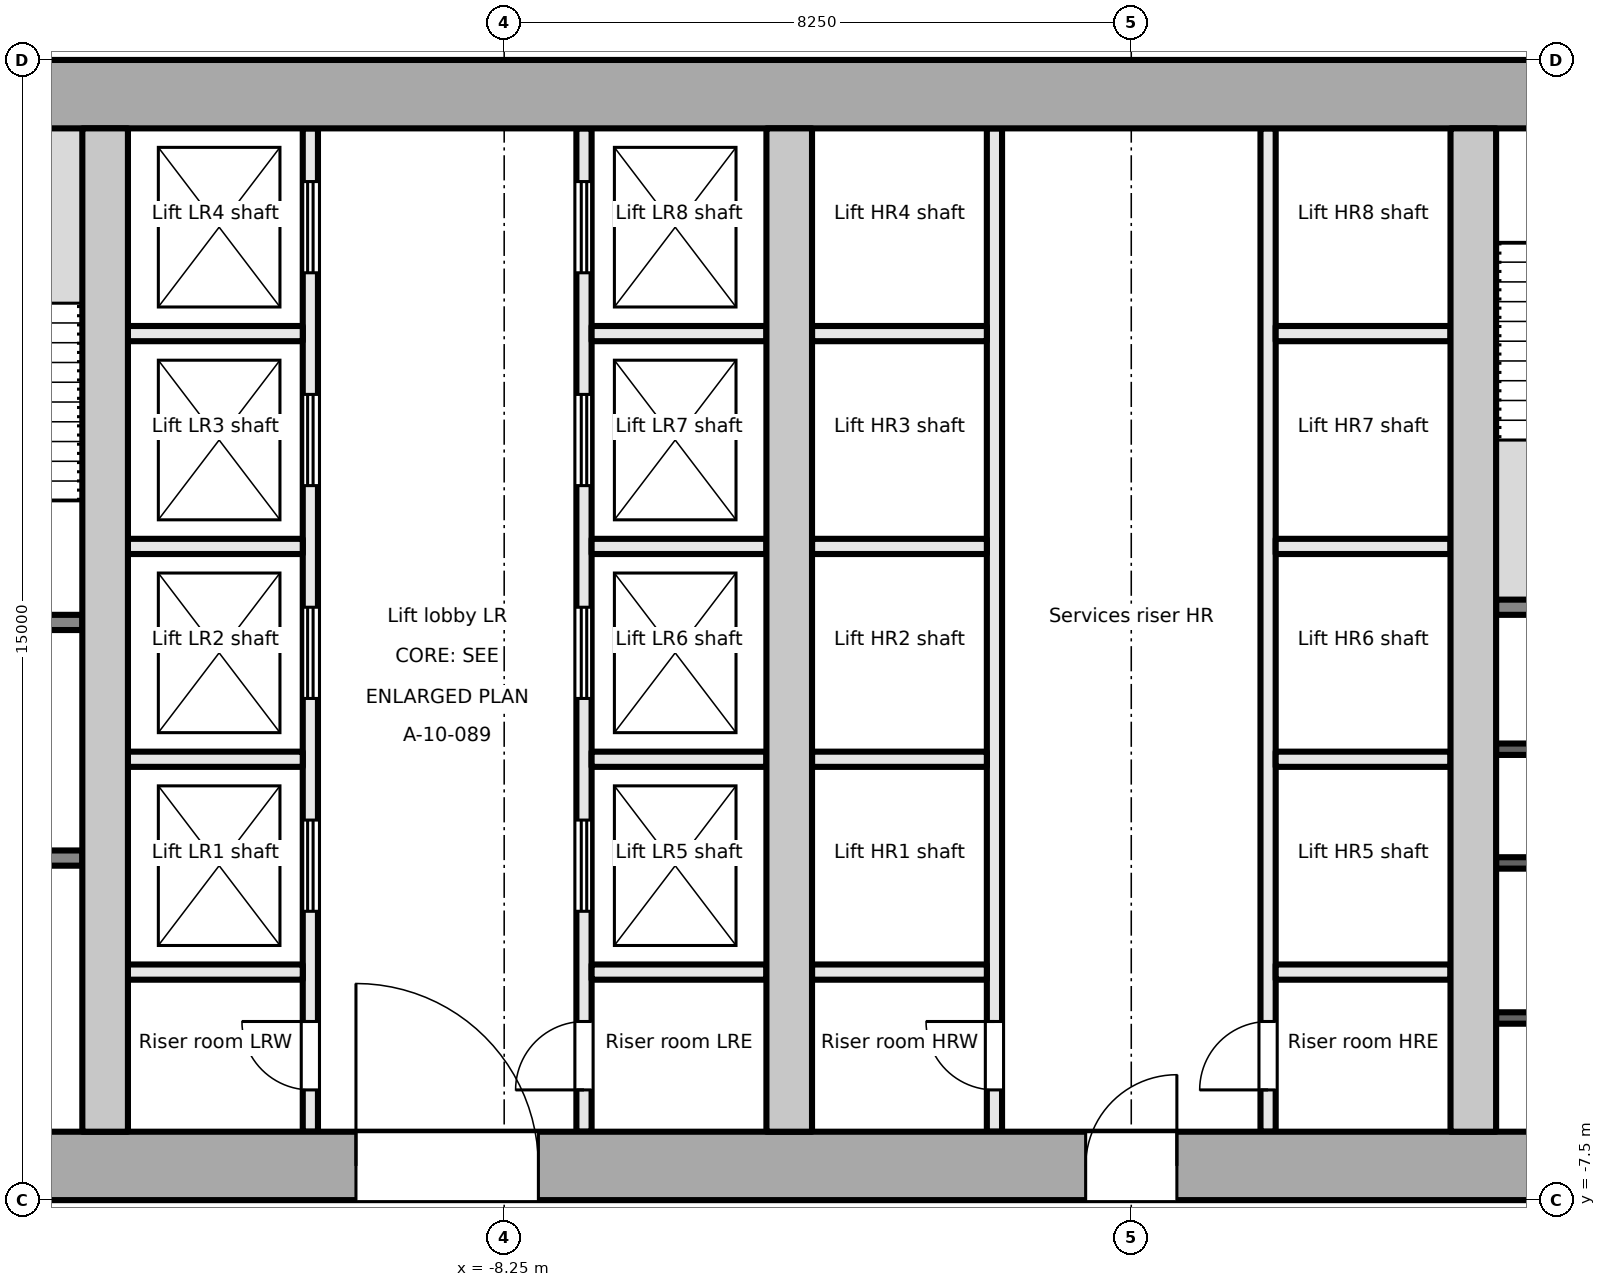
"""IFC4 building model, lengths in metres.
Left out: names, types, materials, properties, quantities, classifications, styles, units other than length and angle.
Written with IfcOpenShell. Run it as: python <this file> out.ifc"""

import sys

from ifc_helpers import new_model, si_unit, direction, frame, frame_2d, origin, place, context, subcontext, project, spatial, rectangle, extrude, element, fill, save


model = new_model("IFC4")
c1 = context("Model", 3, precision=1e-05, world=origin(), true_north=direction((0.0, 1.0)))
c2 = subcontext(c1, "Body", "Model", "MODEL_VIEW")
j1 = project(units=[si_unit("LENGTHUNIT", "METRE"), si_unit("PLANEANGLEUNIT", "RADIAN")], contexts=[c1])
p1 = place(None, origin())
s1 = spatial("IfcSite", under=j1, at=p1, CompositionType="ELEMENT")
p2 = place(p1, origin())
s2 = spatial("IfcBuilding", under=s1, at=p2, CompositionType="ELEMENT")
p3 = place(p2, frame((0.0, 0.0, 61.1)))
s3 = spatial("IfcBuildingStorey", under=s2, at=p3, CompositionType="ELEMENT", Elevation=61.1)
p4 = place(p3, frame((-18.0, -7.05, -0.2), z_axis=(0.0, 0.0, 1.0), x_axis=(1.0, 0.0, 0.0)))
e1 = element("IfcWall", 1, at=p4, inside=s3, PredefinedType="SHEAR", context=c2, shape_type="SweptSolid", body=[
    extrude(rectangle(XDim=36.0, YDim=0.9, at=frame_2d((18.0, 0.0))), origin(), (0.0, 0.0, 1.0), 4.1),
])
p5 = place(p4, frame((7.8, 0.0, 0.2)))
e2 = element("IfcOpeningElement", 2, at=p5, cuts=e1, PredefinedType="OPENING", context=c2, shape_type="SweptSolid", body=[
    extrude(rectangle(XDim=2.4, YDim=2.1, at=frame_2d((1.2, 1.05))), frame((0.0, 0.46, 0.0), z_axis=(0.0, -1.0, 0.0), x_axis=(1.0, 0.0, 0.0)), (0.0, 0.0, 1.0), 0.921),
])
p6 = place(p4, frame((17.4, 0.0, 0.2)))
e3 = element("IfcOpeningElement", 3, at=p6, cuts=e1, PredefinedType="OPENING", context=c2, shape_type="SweptSolid", body=[
    extrude(rectangle(XDim=1.2, YDim=2.1, at=frame_2d((0.6, 1.05))), frame((0.0, 0.46, 0.0), z_axis=(0.0, -1.0, 0.0), x_axis=(1.0, 0.0, 0.0)), (0.0, 0.0, 1.0), 0.921),
])
p7 = place(p4, frame((26.1, 0.0, 0.2)))
e4 = element("IfcOpeningElement", 4, at=p7, cuts=e1, PredefinedType="OPENING", context=c2, shape_type="SweptSolid", body=[
    extrude(rectangle(XDim=2.4, YDim=2.1, at=frame_2d((1.2, 1.05))), frame((0.0, 0.46, 0.0), z_axis=(0.0, -1.0, 0.0), x_axis=(1.0, 0.0, 0.0)), (0.0, 0.0, 1.0), 0.921),
])
p8 = place(p3, frame((-18.0, 7.05, -0.2), z_axis=(0.0, 0.0, 1.0), x_axis=(1.0, 0.0, 0.0)))
e5 = element("IfcWall", 5, at=p8, inside=s3, PredefinedType="SHEAR", context=c2, shape_type="SweptSolid", body=[
    extrude(rectangle(XDim=36.0, YDim=0.9, at=frame_2d((18.0, 0.0))), origin(), (0.0, 0.0, 1.0), 4.1),
])
for number, where, z_axis, x_axis in (
    (6, (-13.5, -6.6, -0.2), (0.0, 0.0, 1.0), (0.0, 1.0, 0.0)),
    (7, (-4.5, -6.6, -0.2), (0.0, 0.0, 1.0), (0.0, 1.0, 0.0)),
    (8, (4.5, -6.6, -0.2), (0.0, 0.0, 1.0), (0.0, 1.0, 0.0)),
):
    element("IfcWall", number, at=place(p3, frame(where, z_axis=z_axis, x_axis=x_axis)), inside=s3, PredefinedType="SHEAR", context=c2, shape_type="SweptSolid", body=[
        extrude(rectangle(XDim=13.2, YDim=0.6, at=frame_2d((6.6, 0.0))), origin(), (0.0, 0.0, 1.0), 4.1),
    ])
p9 = place(p3, frame((-17.1, -3.0, 0.0), z_axis=(0.0, 0.0, 1.0), x_axis=(1.0, 0.0, 0.0)))
e9 = element("IfcWall", 9, at=p9, inside=s3, PredefinedType="PARTITIONING", context=c2, shape_type="SweptSolid", body=[
    extrude(rectangle(XDim=3.3, YDim=0.2, at=frame_2d((1.65, 0.0))), origin(), (0.0, 0.0, 1.0), 3.9),
])
p10 = place(p9, frame((1.1, 0.0, 0.0)))
e10 = element("IfcOpeningElement", 10, at=p10, cuts=e9, PredefinedType="OPENING", context=c2, shape_type="SweptSolid", body=[
    extrude(rectangle(XDim=1.1, YDim=2.1, at=frame_2d((0.55, 1.05))), frame((0.0, 0.111, 0.0), z_axis=(0.0, -1.0, 0.0), x_axis=(1.0, 0.0, 0.0)), (0.0, 0.0, 1.0), 0.221),
])
p11 = place(p3, frame((-17.1, 0.1, 0.0), z_axis=(0.0, 0.0, 1.0), x_axis=(1.0, 0.0, 0.0)))
e11 = element("IfcWall", 11, at=p11, inside=s3, PredefinedType="PARTITIONING", context=c2, shape_type="SweptSolid", body=[
    extrude(rectangle(XDim=3.3, YDim=0.2, at=frame_2d((1.65, 0.0))), origin(), (0.0, 0.0, 1.0), 3.9),
])
p12 = place(p11, frame((1.1, 0.0, 0.0)))
e12 = element("IfcOpeningElement", 12, at=p12, cuts=e11, PredefinedType="OPENING", context=c2, shape_type="SweptSolid", body=[
    extrude(rectangle(XDim=1.1, YDim=2.1, at=frame_2d((0.55, 1.05))), frame((0.0, 0.111, 0.0), z_axis=(0.0, -1.0, 0.0), x_axis=(1.0, 0.0, 0.0)), (0.0, 0.0, 1.0), 0.221),
])
p13 = place(p3, frame((-10.8, -6.6, 0.0), z_axis=(0.0, 0.0, 1.0), x_axis=(0.0, 1.0, 0.0)))
e13 = element("IfcWall", 13, at=p13, inside=s3, PredefinedType="PARTITIONING", context=c2, shape_type="SweptSolid", body=[
    extrude(rectangle(XDim=13.2, YDim=0.2, at=frame_2d((6.6, 0.0))), origin(), (0.0, 0.0, 1.0), 3.9),
])
p14 = place(p13, frame((0.55, 0.0, 0.0)))
e14 = element("IfcOpeningElement", 14, at=p14, cuts=e13, PredefinedType="OPENING", context=c2, shape_type="SweptSolid", body=[
    extrude(rectangle(XDim=0.9, YDim=2.1, at=frame_2d((0.45, 1.05))), frame((0.0, 0.111, 0.0), z_axis=(0.0, -1.0, 0.0), x_axis=(1.0, 0.0, 0.0)), (0.0, 0.0, 1.0), 0.221),
])
p15 = place(p13, frame((2.9, 0.0, 0.0)))
e15 = element("IfcOpeningElement", 15, at=p15, cuts=e13, PredefinedType="OPENING", context=c2, shape_type="SweptSolid", body=[
    extrude(rectangle(XDim=1.2, YDim=2.1, at=frame_2d((0.6, 1.05))), frame((0.0, 0.111, 0.0), z_axis=(0.0, -1.0, 0.0), x_axis=(1.0, 0.0, 0.0)), (0.0, 0.0, 1.0), 0.221),
])
p16 = place(p13, frame((5.7, 0.0, 0.0)))
e16 = element("IfcOpeningElement", 16, at=p16, cuts=e13, PredefinedType="OPENING", context=c2, shape_type="SweptSolid", body=[
    extrude(rectangle(XDim=1.2, YDim=2.1, at=frame_2d((0.6, 1.05))), frame((0.0, 0.111, 0.0), z_axis=(0.0, -1.0, 0.0), x_axis=(1.0, 0.0, 0.0)), (0.0, 0.0, 1.0), 0.221),
])
p17 = place(p13, frame((8.5, 0.0, 0.0)))
e17 = element("IfcOpeningElement", 17, at=p17, cuts=e13, PredefinedType="OPENING", context=c2, shape_type="SweptSolid", body=[
    extrude(rectangle(XDim=1.2, YDim=2.1, at=frame_2d((0.6, 1.05))), frame((0.0, 0.111, 0.0), z_axis=(0.0, -1.0, 0.0), x_axis=(1.0, 0.0, 0.0)), (0.0, 0.0, 1.0), 0.221),
])
p18 = place(p13, frame((11.3, 0.0, 0.0)))
e18 = element("IfcOpeningElement", 18, at=p18, cuts=e13, PredefinedType="OPENING", context=c2, shape_type="SweptSolid", body=[
    extrude(rectangle(XDim=1.2, YDim=2.1, at=frame_2d((0.6, 1.05))), frame((0.0, 0.111, 0.0), z_axis=(0.0, -1.0, 0.0), x_axis=(1.0, 0.0, 0.0)), (0.0, 0.0, 1.0), 0.221),
])
p19 = place(p3, frame((-7.2, -6.6, 0.0), z_axis=(0.0, 0.0, 1.0), x_axis=(0.0, 1.0, 0.0)))
e19 = element("IfcWall", 19, at=p19, inside=s3, PredefinedType="PARTITIONING", context=c2, shape_type="SweptSolid", body=[
    extrude(rectangle(XDim=13.2, YDim=0.2, at=frame_2d((6.6, 0.0))), origin(), (0.0, 0.0, 1.0), 3.9),
])
p20 = place(p19, frame((0.55, 0.0, 0.0)))
e20 = element("IfcOpeningElement", 20, at=p20, cuts=e19, PredefinedType="OPENING", context=c2, shape_type="SweptSolid", body=[
    extrude(rectangle(XDim=0.9, YDim=2.1, at=frame_2d((0.45, 1.05))), frame((0.0, 0.111, 0.0), z_axis=(0.0, -1.0, 0.0), x_axis=(1.0, 0.0, 0.0)), (0.0, 0.0, 1.0), 0.221),
])
p21 = place(p19, frame((2.9, 0.0, 0.0)))
e21 = element("IfcOpeningElement", 21, at=p21, cuts=e19, PredefinedType="OPENING", context=c2, shape_type="SweptSolid", body=[
    extrude(rectangle(XDim=1.2, YDim=2.1, at=frame_2d((0.6, 1.05))), frame((0.0, 0.111, 0.0), z_axis=(0.0, -1.0, 0.0), x_axis=(1.0, 0.0, 0.0)), (0.0, 0.0, 1.0), 0.221),
])
p22 = place(p19, frame((5.7, 0.0, 0.0)))
e22 = element("IfcOpeningElement", 22, at=p22, cuts=e19, PredefinedType="OPENING", context=c2, shape_type="SweptSolid", body=[
    extrude(rectangle(XDim=1.2, YDim=2.1, at=frame_2d((0.6, 1.05))), frame((0.0, 0.111, 0.0), z_axis=(0.0, -1.0, 0.0), x_axis=(1.0, 0.0, 0.0)), (0.0, 0.0, 1.0), 0.221),
])
p23 = place(p19, frame((8.5, 0.0, 0.0)))
e23 = element("IfcOpeningElement", 23, at=p23, cuts=e19, PredefinedType="OPENING", context=c2, shape_type="SweptSolid", body=[
    extrude(rectangle(XDim=1.2, YDim=2.1, at=frame_2d((0.6, 1.05))), frame((0.0, 0.111, 0.0), z_axis=(0.0, -1.0, 0.0), x_axis=(1.0, 0.0, 0.0)), (0.0, 0.0, 1.0), 0.221),
])
p24 = place(p19, frame((11.3, 0.0, 0.0)))
e24 = element("IfcOpeningElement", 24, at=p24, cuts=e19, PredefinedType="OPENING", context=c2, shape_type="SweptSolid", body=[
    extrude(rectangle(XDim=1.2, YDim=2.1, at=frame_2d((0.6, 1.05))), frame((0.0, 0.111, 0.0), z_axis=(0.0, -1.0, 0.0), x_axis=(1.0, 0.0, 0.0)), (0.0, 0.0, 1.0), 0.221),
])
for number, where, z_axis, x_axis in (
    (25, (-13.2, -1.7, 0.0), (0.0, 0.0, 1.0), (1.0, 0.0, 0.0)),
    (26, (-13.2, 1.1, 0.0), (0.0, 0.0, 1.0), (1.0, 0.0, 0.0)),
    (27, (-13.2, 3.9, 0.0), (0.0, 0.0, 1.0), (1.0, 0.0, 0.0)),
    (28, (-13.2, -4.5, 0.0), (0.0, 0.0, 1.0), (1.0, 0.0, 0.0)),
    (29, (-7.1, -1.7, 0.0), (0.0, 0.0, 1.0), (1.0, 0.0, 0.0)),
    (30, (-7.1, 1.1, 0.0), (0.0, 0.0, 1.0), (1.0, 0.0, 0.0)),
    (31, (-7.1, 3.9, 0.0), (0.0, 0.0, 1.0), (1.0, 0.0, 0.0)),
    (32, (-7.1, -4.5, 0.0), (0.0, 0.0, 1.0), (1.0, 0.0, 0.0)),
):
    element("IfcWall", number, at=place(p3, frame(where, z_axis=z_axis, x_axis=x_axis)), inside=s3, PredefinedType="PARTITIONING", context=c2, shape_type="SweptSolid", body=[
        extrude(rectangle(XDim=2.3, YDim=0.2, at=frame_2d((1.15, 0.0))), origin(), (0.0, 0.0, 1.0), 3.9),
    ])
p25 = place(p3, frame((-1.8, -6.6, 0.0), z_axis=(0.0, 0.0, 1.0), x_axis=(0.0, 1.0, 0.0)))
e33 = element("IfcWall", 33, at=p25, inside=s3, PredefinedType="PARTITIONING", context=c2, shape_type="SweptSolid", body=[
    extrude(rectangle(XDim=13.2, YDim=0.2, at=frame_2d((6.6, 0.0))), origin(), (0.0, 0.0, 1.0), 3.9),
])
p26 = place(p25, frame((0.55, 0.0, 0.0)))
e34 = element("IfcOpeningElement", 34, at=p26, cuts=e33, PredefinedType="OPENING", context=c2, shape_type="SweptSolid", body=[
    extrude(rectangle(XDim=0.9, YDim=2.1, at=frame_2d((0.45, 1.05))), frame((0.0, 0.111, 0.0), z_axis=(0.0, -1.0, 0.0), x_axis=(1.0, 0.0, 0.0)), (0.0, 0.0, 1.0), 0.221),
])
p27 = place(p3, frame((1.8, -6.6, 0.0), z_axis=(0.0, 0.0, 1.0), x_axis=(0.0, 1.0, 0.0)))
e35 = element("IfcWall", 35, at=p27, inside=s3, PredefinedType="PARTITIONING", context=c2, shape_type="SweptSolid", body=[
    extrude(rectangle(XDim=13.2, YDim=0.2, at=frame_2d((6.6, 0.0))), origin(), (0.0, 0.0, 1.0), 3.9),
])
p28 = place(p27, frame((0.55, 0.0, 0.0)))
e36 = element("IfcOpeningElement", 36, at=p28, cuts=e35, PredefinedType="OPENING", context=c2, shape_type="SweptSolid", body=[
    extrude(rectangle(XDim=0.9, YDim=2.1, at=frame_2d((0.45, 1.05))), frame((0.0, 0.111, 0.0), z_axis=(0.0, -1.0, 0.0), x_axis=(1.0, 0.0, 0.0)), (0.0, 0.0, 1.0), 0.221),
])
for number, where, z_axis, x_axis in (
    (37, (-4.2, -1.7, 0.0), (0.0, 0.0, 1.0), (1.0, 0.0, 0.0)),
    (38, (-4.2, 1.1, 0.0), (0.0, 0.0, 1.0), (1.0, 0.0, 0.0)),
    (39, (-4.2, 3.9, 0.0), (0.0, 0.0, 1.0), (1.0, 0.0, 0.0)),
    (40, (-4.2, -4.5, 0.0), (0.0, 0.0, 1.0), (1.0, 0.0, 0.0)),
    (41, (1.9, -1.7, 0.0), (0.0, 0.0, 1.0), (1.0, 0.0, 0.0)),
    (42, (1.9, 1.1, 0.0), (0.0, 0.0, 1.0), (1.0, 0.0, 0.0)),
    (43, (1.9, 3.9, 0.0), (0.0, 0.0, 1.0), (1.0, 0.0, 0.0)),
    (44, (1.9, -4.5, 0.0), (0.0, 0.0, 1.0), (1.0, 0.0, 0.0)),
):
    element("IfcWall", number, at=place(p3, frame(where, z_axis=z_axis, x_axis=x_axis)), inside=s3, PredefinedType="PARTITIONING", context=c2, shape_type="SweptSolid", body=[
        extrude(rectangle(XDim=2.3, YDim=0.2, at=frame_2d((1.15, 0.0))), origin(), (0.0, 0.0, 1.0), 3.9),
    ])
p29 = place(p3, frame((4.8, 0.3, 0.0), z_axis=(0.0, 0.0, 1.0), x_axis=(1.0, 0.0, 0.0)))
e45 = element("IfcWall", 45, at=p29, inside=s3, PredefinedType="PARTITIONING", context=c2, shape_type="SweptSolid", body=[
    extrude(rectangle(XDim=3.15, YDim=0.2, at=frame_2d((1.575, 0.0))), origin(), (0.0, 0.0, 1.0), 3.9),
])
for number, where, z_axis, x_axis in (
    (46, (4.8, -5.104, 0.0), (0.0, 0.0, 1.0), (1.0, 0.0, 0.0)),
    (47, (4.8, -3.064, 0.0), (0.0, 0.0, 1.0), (1.0, 0.0, 0.0)),
    (48, (4.8, -1.568, 0.0), (0.0, 0.0, 1.0), (1.0, 0.0, 0.0)),
):
    element("IfcWall", number, at=place(p3, frame(where, z_axis=z_axis, x_axis=x_axis)), inside=s3, PredefinedType="PARTITIONING", context=c2, shape_type="SweptSolid", body=[
        extrude(rectangle(XDim=3.15, YDim=0.15, at=frame_2d((1.575, 0.0))), origin(), (0.0, 0.0, 1.0), 3.9),
    ])
p30 = place(p14, origin())
e49 = element("IfcDoor", 49, at=p30, inside=s3, OperationType="SINGLE_SWING_RIGHT", PredefinedType="DOOR", context=c2, shape_type="SweptSolid", body=[
    extrude(rectangle(XDim=0.9, YDim=2.1, at=frame_2d((0.45, 1.05))), frame((0.0, 0.025, 0.0), z_axis=(0.0, -1.0, 0.0), x_axis=(1.0, 0.0, 0.0)), (0.0, 0.0, 1.0), 0.05),
])
fill(e14, e49)
p31 = place(p15, origin())
e50 = element("IfcDoor", 50, at=p31, inside=s3, OperationType="DOUBLE_DOOR_SLIDING", PredefinedType="DOOR", context=c2, shape_type="SweptSolid", body=[
    extrude(rectangle(XDim=1.2, YDim=2.1, at=frame_2d((0.6, 1.05))), frame((0.0, 0.025, 0.0), z_axis=(0.0, -1.0, 0.0), x_axis=(1.0, 0.0, 0.0)), (0.0, 0.0, 1.0), 0.05),
])
fill(e15, e50)
p32 = place(p16, origin())
e51 = element("IfcDoor", 51, at=p32, inside=s3, OperationType="DOUBLE_DOOR_SLIDING", PredefinedType="DOOR", context=c2, shape_type="SweptSolid", body=[
    extrude(rectangle(XDim=1.2, YDim=2.1, at=frame_2d((0.6, 1.05))), frame((0.0, 0.025, 0.0), z_axis=(0.0, -1.0, 0.0), x_axis=(1.0, 0.0, 0.0)), (0.0, 0.0, 1.0), 0.05),
])
fill(e16, e51)
p33 = place(p17, origin())
e52 = element("IfcDoor", 52, at=p33, inside=s3, OperationType="DOUBLE_DOOR_SLIDING", PredefinedType="DOOR", context=c2, shape_type="SweptSolid", body=[
    extrude(rectangle(XDim=1.2, YDim=2.1, at=frame_2d((0.6, 1.05))), frame((0.0, 0.025, 0.0), z_axis=(0.0, -1.0, 0.0), x_axis=(1.0, 0.0, 0.0)), (0.0, 0.0, 1.0), 0.05),
])
fill(e17, e52)
p34 = place(p18, origin())
e53 = element("IfcDoor", 53, at=p34, inside=s3, OperationType="DOUBLE_DOOR_SLIDING", PredefinedType="DOOR", context=c2, shape_type="SweptSolid", body=[
    extrude(rectangle(XDim=1.2, YDim=2.1, at=frame_2d((0.6, 1.05))), frame((0.0, 0.025, 0.0), z_axis=(0.0, -1.0, 0.0), x_axis=(1.0, 0.0, 0.0)), (0.0, 0.0, 1.0), 0.05),
])
fill(e18, e53)
p35 = place(p20, origin())
e54 = element("IfcDoor", 54, at=p35, inside=s3, OperationType="SINGLE_SWING_LEFT", PredefinedType="DOOR", context=c2, shape_type="SweptSolid", body=[
    extrude(rectangle(XDim=0.9, YDim=2.1, at=frame_2d((0.45, 1.05))), frame((0.0, 0.025, 0.0), z_axis=(0.0, -1.0, 0.0), x_axis=(1.0, 0.0, 0.0)), (0.0, 0.0, 1.0), 0.05),
])
fill(e20, e54)
p36 = place(p21, origin())
e55 = element("IfcDoor", 55, at=p36, inside=s3, OperationType="DOUBLE_DOOR_SLIDING", PredefinedType="DOOR", context=c2, shape_type="SweptSolid", body=[
    extrude(rectangle(XDim=1.2, YDim=2.1, at=frame_2d((0.6, 1.05))), frame((0.0, 0.025, 0.0), z_axis=(0.0, -1.0, 0.0), x_axis=(1.0, 0.0, 0.0)), (0.0, 0.0, 1.0), 0.05),
])
fill(e21, e55)
p37 = place(p22, origin())
e56 = element("IfcDoor", 56, at=p37, inside=s3, OperationType="DOUBLE_DOOR_SLIDING", PredefinedType="DOOR", context=c2, shape_type="SweptSolid", body=[
    extrude(rectangle(XDim=1.2, YDim=2.1, at=frame_2d((0.6, 1.05))), frame((0.0, 0.025, 0.0), z_axis=(0.0, -1.0, 0.0), x_axis=(1.0, 0.0, 0.0)), (0.0, 0.0, 1.0), 0.05),
])
fill(e22, e56)
p38 = place(p23, origin())
e57 = element("IfcDoor", 57, at=p38, inside=s3, OperationType="DOUBLE_DOOR_SLIDING", PredefinedType="DOOR", context=c2, shape_type="SweptSolid", body=[
    extrude(rectangle(XDim=1.2, YDim=2.1, at=frame_2d((0.6, 1.05))), frame((0.0, 0.025, 0.0), z_axis=(0.0, -1.0, 0.0), x_axis=(1.0, 0.0, 0.0)), (0.0, 0.0, 1.0), 0.05),
])
fill(e23, e57)
p39 = place(p24, origin())
e58 = element("IfcDoor", 58, at=p39, inside=s3, OperationType="DOUBLE_DOOR_SLIDING", PredefinedType="DOOR", context=c2, shape_type="SweptSolid", body=[
    extrude(rectangle(XDim=1.2, YDim=2.1, at=frame_2d((0.6, 1.05))), frame((0.0, 0.025, 0.0), z_axis=(0.0, -1.0, 0.0), x_axis=(1.0, 0.0, 0.0)), (0.0, 0.0, 1.0), 0.05),
])
fill(e24, e58)
p40 = place(p5, origin())
e59 = element("IfcDoor", 59, at=p40, inside=s3, OperationType="DOUBLE_DOOR_DOUBLE_SWING", PredefinedType="DOOR", context=c2, shape_type="SweptSolid", body=[
    extrude(rectangle(XDim=2.4, YDim=2.1, at=frame_2d((1.2, 1.05))), frame((0.0, 0.025, 0.0), z_axis=(0.0, -1.0, 0.0), x_axis=(1.0, 0.0, 0.0)), (0.0, 0.0, 1.0), 0.05),
])
fill(e2, e59)
p41 = place(p26, origin())
e60 = element("IfcDoor", 60, at=p41, inside=s3, OperationType="SINGLE_SWING_RIGHT", PredefinedType="DOOR", context=c2, shape_type="SweptSolid", body=[
    extrude(rectangle(XDim=0.9, YDim=2.1, at=frame_2d((0.45, 1.05))), frame((0.0, 0.025, 0.0), z_axis=(0.0, -1.0, 0.0), x_axis=(1.0, 0.0, 0.0)), (0.0, 0.0, 1.0), 0.05),
])
fill(e34, e60)
p42 = place(p28, origin())
e61 = element("IfcDoor", 61, at=p42, inside=s3, OperationType="SINGLE_SWING_LEFT", PredefinedType="DOOR", context=c2, shape_type="SweptSolid", body=[
    extrude(rectangle(XDim=0.9, YDim=2.1, at=frame_2d((0.45, 1.05))), frame((0.0, 0.025, 0.0), z_axis=(0.0, -1.0, 0.0), x_axis=(1.0, 0.0, 0.0)), (0.0, 0.0, 1.0), 0.05),
])
fill(e36, e61)
p43 = place(p6, origin())
e62 = element("IfcDoor", 62, at=p43, inside=s3, OperationType="SINGLE_SWING_RIGHT", PredefinedType="DOOR", context=c2, shape_type="SweptSolid", body=[
    extrude(rectangle(XDim=1.2, YDim=2.1, at=frame_2d((0.6, 1.05))), frame((0.0, 0.025, 0.0), z_axis=(0.0, -1.0, 0.0), x_axis=(1.0, 0.0, 0.0)), (0.0, 0.0, 1.0), 0.05),
])
fill(e3, e62)
save(model, sys.argv[1])
